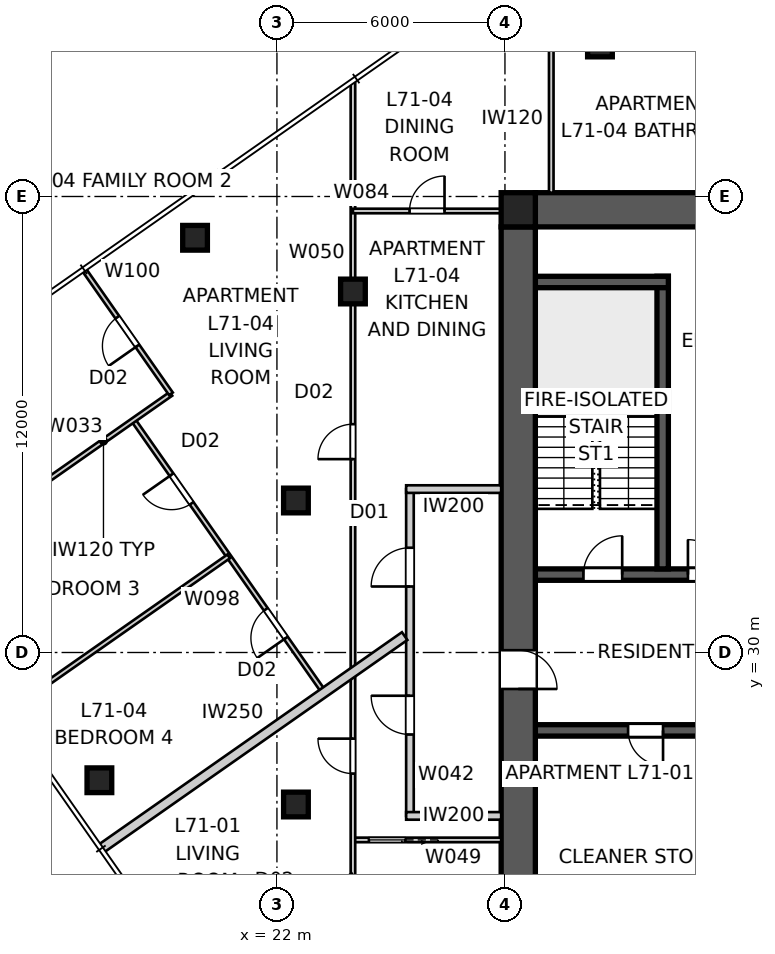
"""IFC4 building model, lengths in metres.
Left out: names, types, materials, properties, quantities, classifications, styles, units other than length and angle.
Written with IfcOpenShell. Run it as: python <this file> out.ifc"""

import sys

from ifc_helpers import new_model, si_unit, direction, frame, frame_2d, origin, origin_2d, place, context, subcontext, project, spatial, polyline, rectangle, outline, extrude, element, fill, save


model = new_model("IFC4")
c1 = context("Model", 3, precision=1e-05, world=origin(), true_north=direction((0.0, 1.0)))
c2 = subcontext(c1, "Body", "Model", "MODEL_VIEW")
j1 = project(units=[si_unit("LENGTHUNIT", "METRE"), si_unit("PLANEANGLEUNIT", "RADIAN")], contexts=[c1])
p1 = place(None, origin())
s1 = spatial("IfcSite", under=j1, at=p1, CompositionType="ELEMENT")
p2 = place(p1, origin())
s2 = spatial("IfcBuilding", under=s1, at=p2, CompositionType="ELEMENT")
p3 = place(p2, frame((0.0, 0.0, 257.4)))
s3 = spatial("IfcBuildingStorey", under=s2, at=p3, CompositionType="ELEMENT", Elevation=257.4)
p4 = place(p3, frame((28.8, 41.65, 0.0), z_axis=(0.0, 0.0, 1.0), x_axis=(1.0, 0.0, 0.0)))
e1 = element("IfcWall", 1, at=p4, inside=s3, PredefinedType="SHEAR", context=c2, shape_type="SweptSolid", body=[
    extrude(outline(polyline([(0.0, -0.45), (22.4, -0.45), (22.4, -0.025), (22.85, -0.025), (22.85, 0.025), (22.4, 0.025), (22.4, 0.45), (0.0, 0.45), (0.0, 0.025), (-0.45, 0.025), (-0.45, -0.025), (0.0, -0.025), (0.0, -0.45)])), origin(), (0.0, 0.0, 1.0), 3.4),
])
p5 = place(p3, frame((28.35, 41.2, 0.0), z_axis=(0.0, 0.0, 1.0), x_axis=(0.0, -1.0, 0.0)))
e2 = element("IfcWall", 2, at=p5, inside=s3, PredefinedType="SHEAR", context=c2, shape_type="SweptSolid", body=[
    extrude(outline(polyline([(0.0, -0.45), (22.4, -0.45), (22.4, -0.025), (22.85, -0.025), (22.85, 0.025), (22.4, 0.025), (22.4, 0.45), (0.0, 0.45), (0.0, 0.025), (-0.45, 0.025), (-0.45, -0.025), (0.0, -0.025), (0.0, -0.45)])), origin(), (0.0, 0.0, 1.0), 3.4),
])
p6 = place(p5, frame((11.14, 0.0, 0.0)))
e3 = element("IfcOpeningElement", 3, at=p6, cuts=e2, PredefinedType="OPENING", context=c2, shape_type="SweptSolid", body=[
    extrude(rectangle(XDim=1.02, YDim=2.4, at=frame_2d((0.51, 1.2))), frame((0.0, 0.46, 0.0), z_axis=(0.0, -1.0, 0.0), x_axis=(1.0, 0.0, 0.0)), (0.0, 0.0, 1.0), 0.92),
])
p7 = place(p3, frame((28.8, 32.05, 0.0), z_axis=(0.0, 0.0, 1.0), x_axis=(1.0, 0.0, 0.0)))
e4 = element("IfcWall", 4, at=p7, inside=s3, PredefinedType="SHEAR", context=c2, shape_type="SweptSolid", body=[
    extrude(rectangle(XDim=22.4, YDim=0.3, at=frame_2d((11.2, 0.0))), origin(), (0.0, 0.0, 1.0), 3.4),
])
p8 = place(p7, frame((19.04, 0.0, 0.0)))
e5 = element("IfcOpeningElement", 5, at=p8, cuts=e4, PredefinedType="OPENING", context=c2, shape_type="SweptSolid", body=[
    extrude(rectangle(XDim=0.92, YDim=2.1, at=frame_2d((0.46, 1.05))), frame((0.0, 0.16, 0.0), z_axis=(0.0, -1.0, 0.0), x_axis=(1.0, 0.0, 0.0)), (0.0, 0.0, 1.0), 0.32),
])
p9 = place(p7, frame((1.265, 0.0, 0.0)))
e6 = element("IfcOpeningElement", 6, at=p9, cuts=e4, PredefinedType="OPENING", context=c2, shape_type="SweptSolid", body=[
    extrude(rectangle(XDim=1.02, YDim=2.1, at=frame_2d((0.51, 1.05))), frame((0.0, 0.16, 0.0), z_axis=(0.0, -1.0, 0.0), x_axis=(1.0, 0.0, 0.0)), (0.0, 0.0, 1.0), 0.32),
])
p10 = place(p7, frame((4.015, 0.0, 0.0)))
e7 = element("IfcOpeningElement", 7, at=p10, cuts=e4, PredefinedType="OPENING", context=c2, shape_type="SweptSolid", body=[
    extrude(rectangle(XDim=0.92, YDim=2.1, at=frame_2d((0.46, 1.05))), frame((0.0, 0.16, 0.0), z_axis=(0.0, -1.0, 0.0), x_axis=(1.0, 0.0, 0.0)), (0.0, 0.0, 1.0), 0.32),
])
p11 = place(p7, frame((7.015, 0.0, 0.0)))
e8 = element("IfcOpeningElement", 8, at=p11, cuts=e4, PredefinedType="OPENING", context=c2, shape_type="SweptSolid", body=[
    extrude(rectangle(XDim=0.92, YDim=2.1, at=frame_2d((0.46, 1.05))), frame((0.0, 0.16, 0.0), z_axis=(0.0, -1.0, 0.0), x_axis=(1.0, 0.0, 0.0)), (0.0, 0.0, 1.0), 0.32),
])
p12 = place(p7, frame((9.34, 0.0, 0.0)))
e9 = element("IfcOpeningElement", 9, at=p12, cuts=e4, PredefinedType="OPENING", context=c2, shape_type="SweptSolid", body=[
    extrude(rectangle(XDim=0.92, YDim=2.1, at=frame_2d((0.46, 1.05))), frame((0.0, 0.16, 0.0), z_axis=(0.0, -1.0, 0.0), x_axis=(1.0, 0.0, 0.0)), (0.0, 0.0, 1.0), 0.32),
])
p13 = place(p7, frame((12.05, 0.0, 0.0)))
e10 = element("IfcOpeningElement", 10, at=p13, cuts=e4, PredefinedType="OPENING", context=c2, shape_type="SweptSolid", body=[
    extrude(rectangle(XDim=1.1, YDim=2.1, at=frame_2d((0.55, 1.05))), frame((0.0, 0.16, 0.0), z_axis=(0.0, -1.0, 0.0), x_axis=(1.0, 0.0, 0.0)), (0.0, 0.0, 1.0), 0.32),
])
p14 = place(p7, frame((14.85, 0.0, 0.0)))
e11 = element("IfcOpeningElement", 11, at=p14, cuts=e4, PredefinedType="OPENING", context=c2, shape_type="SweptSolid", body=[
    extrude(rectangle(XDim=1.1, YDim=2.1, at=frame_2d((0.55, 1.05))), frame((0.0, 0.16, 0.0), z_axis=(0.0, -1.0, 0.0), x_axis=(1.0, 0.0, 0.0)), (0.0, 0.0, 1.0), 0.32),
])
p15 = place(p3, frame((51.2, 27.95, 0.0), z_axis=(0.0, 0.0, 1.0), x_axis=(-1.0, 0.0, 0.0)))
e12 = element("IfcWall", 12, at=p15, inside=s3, PredefinedType="SHEAR", context=c2, shape_type="SweptSolid", body=[
    extrude(rectangle(XDim=22.4, YDim=0.3, at=frame_2d((11.2, 0.0))), origin(), (0.0, 0.0, 1.0), 3.4),
])
p16 = place(p15, frame((19.04, 0.0, 0.0)))
e13 = element("IfcOpeningElement", 13, at=p16, cuts=e12, PredefinedType="OPENING", context=c2, shape_type="SweptSolid", body=[
    extrude(rectangle(XDim=0.92, YDim=2.1, at=frame_2d((0.46, 1.05))), frame((0.0, 0.16, 0.0), z_axis=(0.0, -1.0, 0.0), x_axis=(1.0, 0.0, 0.0)), (0.0, 0.0, 1.0), 0.32),
])
p17 = place(p15, frame((1.265, 0.0, 0.0)))
e14 = element("IfcOpeningElement", 14, at=p17, cuts=e12, PredefinedType="OPENING", context=c2, shape_type="SweptSolid", body=[
    extrude(rectangle(XDim=1.02, YDim=2.1, at=frame_2d((0.51, 1.05))), frame((0.0, 0.16, 0.0), z_axis=(0.0, -1.0, 0.0), x_axis=(1.0, 0.0, 0.0)), (0.0, 0.0, 1.0), 0.32),
])
p18 = place(p15, frame((4.015, 0.0, 0.0)))
e15 = element("IfcOpeningElement", 15, at=p18, cuts=e12, PredefinedType="OPENING", context=c2, shape_type="SweptSolid", body=[
    extrude(rectangle(XDim=0.92, YDim=2.1, at=frame_2d((0.46, 1.05))), frame((0.0, 0.16, 0.0), z_axis=(0.0, -1.0, 0.0), x_axis=(1.0, 0.0, 0.0)), (0.0, 0.0, 1.0), 0.32),
])
p19 = place(p15, frame((9.79, 0.0, 0.0)))
e16 = element("IfcOpeningElement", 16, at=p19, cuts=e12, PredefinedType="OPENING", context=c2, shape_type="SweptSolid", body=[
    extrude(rectangle(XDim=0.92, YDim=2.1, at=frame_2d((0.46, 1.05))), frame((0.0, 0.16, 0.0), z_axis=(0.0, -1.0, 0.0), x_axis=(1.0, 0.0, 0.0)), (0.0, 0.0, 1.0), 0.32),
])
p20 = place(p15, frame((6.115, 0.0, 0.0)))
e17 = element("IfcOpeningElement", 17, at=p20, cuts=e12, PredefinedType="OPENING", context=c2, shape_type="SweptSolid", body=[
    extrude(rectangle(XDim=0.92, YDim=2.1, at=frame_2d((0.46, 1.05))), frame((0.0, 0.16, 0.0), z_axis=(0.0, -1.0, 0.0), x_axis=(1.0, 0.0, 0.0)), (0.0, 0.0, 1.0), 0.32),
])
p21 = place(p15, frame((12.05, 0.0, 0.0)))
e18 = element("IfcOpeningElement", 18, at=p21, cuts=e12, PredefinedType="OPENING", context=c2, shape_type="SweptSolid", body=[
    extrude(rectangle(XDim=1.1, YDim=2.1, at=frame_2d((0.55, 1.05))), frame((0.0, 0.16, 0.0), z_axis=(0.0, -1.0, 0.0), x_axis=(1.0, 0.0, 0.0)), (0.0, 0.0, 1.0), 0.32),
])
p22 = place(p15, frame((14.85, 0.0, 0.0)))
e19 = element("IfcOpeningElement", 19, at=p22, cuts=e12, PredefinedType="OPENING", context=c2, shape_type="SweptSolid", body=[
    extrude(rectangle(XDim=1.1, YDim=2.1, at=frame_2d((0.55, 1.05))), frame((0.0, 0.16, 0.0), z_axis=(0.0, -1.0, 0.0), x_axis=(1.0, 0.0, 0.0)), (0.0, 0.0, 1.0), 0.32),
])
p23 = place(p3, frame((32.15, 32.2, 0.0), z_axis=(0.0, 0.0, 1.0), x_axis=(0.0, 1.0, 0.0)))
e20 = element("IfcWall", 20, at=p23, inside=s3, PredefinedType="SHEAR", context=c2, shape_type="SweptSolid", body=[
    extrude(rectangle(XDim=7.7, YDim=0.3, at=frame_2d((3.85, 0.0))), origin(), (0.0, 0.0, 1.0), 3.4),
])
p24 = place(p3, frame((28.8, 39.75, 0.0), z_axis=(0.0, 0.0, 1.0), x_axis=(1.0, 0.0, 0.0)))
e21 = element("IfcWall", 21, at=p24, inside=s3, PredefinedType="SHEAR", context=c2, shape_type="SweptSolid", body=[
    extrude(rectangle(XDim=3.5, YDim=0.3, at=frame_2d((1.75, 0.0))), origin(), (0.0, 0.0, 1.0), 3.4),
])
p25 = place(p3, frame((28.35, 41.65, 0.0), z_axis=(0.0, 0.0, 1.0), x_axis=(1.0, 0.0, 0.0)))
e22 = element("IfcColumn", 22, at=p25, inside=s3, PredefinedType="COLUMN", context=c2, shape_type="SweptSolid", body=[
    extrude(rectangle(XDim=0.9, YDim=0.9, at=origin_2d()), origin(), (0.0, 0.0, 1.0), 3.4),
])
for number, where, z_axis, x_axis in (
    (23, (19.845, 40.914, 0.0), (0.0, 0.0, 1.0), (1.0, 0.0, 0.0)),
    (24, (17.328, 26.638, 0.0), (0.0, 0.0, 1.0), (1.0, 0.0, 0.0)),
    (25, (30.5, 46.0, 0.0), (0.0, 0.0, 1.0), (1.0, 0.0, 0.0)),
    (26, (24.0, 39.5, 0.0), (0.0, 0.0, 1.0), (1.0, 0.0, 0.0)),
    (27, (22.5, 34.0, 0.0), (0.0, 0.0, 1.0), (1.0, 0.0, 0.0)),
    (28, (22.5, 26.0, 0.0), (0.0, 0.0, 1.0), (1.0, 0.0, 0.0)),
):
    element("IfcColumn", number, at=place(p3, frame(where, z_axis=z_axis, x_axis=x_axis)), inside=s3, PredefinedType="COLUMN", context=c2, shape_type="SweptSolid", body=[
        extrude(rectangle(XDim=0.65, YDim=0.65, at=origin_2d()), origin(), (0.0, 0.0, 1.0), 3.4),
    ])
p26 = place(p3, frame((25.5, 25.7, 0.0), z_axis=(0.0, 0.0, 1.0), x_axis=(0.0, 1.0, 0.0)))
e29 = element("IfcWall", 29, at=p26, inside=s3, PredefinedType="PARTITIONING", context=c2, shape_type="SweptSolid", body=[
    extrude(rectangle(XDim=8.6, YDim=0.2, at=frame_2d((4.3, 0.0))), origin(), (0.0, 0.0, 1.0), 3.25),
])
p27 = place(p26, frame((2.142, 0.0, 0.0)))
e30 = element("IfcOpeningElement", 30, at=p27, cuts=e29, PredefinedType="OPENING", context=c2, shape_type="SweptSolid", body=[
    extrude(rectangle(XDim=1.02, YDim=2.34, at=frame_2d((0.51, 1.17))), frame((0.0, 0.11, 0.0), z_axis=(0.0, -1.0, 0.0), x_axis=(1.0, 0.0, 0.0)), (0.0, 0.0, 1.0), 0.22),
])
p28 = place(p26, frame((6.037, 0.0, 0.0)))
e31 = element("IfcOpeningElement", 31, at=p28, cuts=e29, PredefinedType="OPENING", context=c2, shape_type="SweptSolid", body=[
    extrude(rectangle(XDim=1.02, YDim=2.34, at=frame_2d((0.51, 1.17))), frame((0.0, 0.11, 0.0), z_axis=(0.0, -1.0, 0.0), x_axis=(1.0, 0.0, 0.0)), (0.0, 0.0, 1.0), 0.22),
])
for number, where, z_axis, x_axis in (
    (32, (27.9, 34.3, 0.0), (0.0, 0.0, 1.0), (-1.0, 0.0, 0.0)),
    (33, (27.9, 25.7, 0.0), (0.0, 0.0, 1.0), (-1.0, 0.0, 0.0)),
):
    element("IfcWall", number, at=place(p3, frame(where, z_axis=z_axis, x_axis=x_axis)), inside=s3, PredefinedType="PARTITIONING", context=c2, shape_type="SweptSolid", body=[
        extrude(rectangle(XDim=2.5, YDim=0.2, at=frame_2d((1.25, 0.0))), origin(), (0.0, 0.0, 1.0), 3.25),
    ])
p29 = place(p3, frame((17.369, 24.836, 0.0), z_axis=(0.0, 0.0, 1.0), x_axis=(0.81915902312, 0.573566469418, 0.0)))
e34 = element("IfcWall", 34, at=p29, inside=s3, PredefinedType="PARTITIONING", context=c2, shape_type="SweptSolid", body=[
    extrude(rectangle(XDim=9.756, YDim=0.25, at=frame_2d((4.878, 0.0))), origin(), (0.0, 0.0, 1.0), 3.25),
])
p30 = place(p3, frame((27.9, 25.068, 0.0), z_axis=(0.0, 0.0, 1.0), x_axis=(-1.0, 0.0, 0.0)))
e35 = element("IfcWall", 35, at=p30, inside=s3, PredefinedType="PARTITIONING", context=c2, shape_type="SweptSolid", body=[
    extrude(rectangle(XDim=3.9, YDim=0.12, at=frame_2d((1.95, 0.0))), origin(), (0.0, 0.0, 1.0), 3.25),
])
p31 = place(p30, frame((2.52, 0.0, 0.0)))
e36 = element("IfcOpeningElement", 36, at=p31, cuts=e35, PredefinedType="OPENING", context=c2, shape_type="SweptSolid", body=[
    extrude(rectangle(XDim=0.96, YDim=2.1, at=frame_2d((0.48, 1.05))), frame((0.0, 0.07, 0.0), z_axis=(0.0, -1.0, 0.0), x_axis=(1.0, 0.0, 0.0)), (0.0, 0.0, 1.0), 0.14),
])
p32 = place(p3, frame((24.0, 18.797, 0.0), z_axis=(0.0, 0.0, 1.0), x_axis=(0.0, 1.0, 0.0)))
e37 = element("IfcWall", 37, at=p32, inside=s3, PredefinedType="PARTITIONING", context=c2, shape_type="SweptSolid", body=[
    extrude(rectangle(XDim=26.198, YDim=0.12, at=frame_2d((13.099, 0.0))), origin(), (0.0, 0.0, 1.0), 2.55),
])
p33 = place(p32, frame((8.016, 0.0, 0.0)))
e38 = element("IfcOpeningElement", 38, at=p33, cuts=e37, PredefinedType="OPENING", context=c2, shape_type="SweptSolid", body=[
    extrude(rectangle(XDim=0.92, YDim=2.34, at=frame_2d((0.46, 1.17))), frame((0.0, 0.07, 0.0), z_axis=(0.0, -1.0, 0.0), x_axis=(1.0, 0.0, 0.0)), (0.0, 0.0, 1.0), 0.14),
])
p34 = place(p32, frame((16.292, 0.0, 0.0)))
e39 = element("IfcOpeningElement", 39, at=p34, cuts=e37, PredefinedType="OPENING", context=c2, shape_type="SweptSolid", body=[
    extrude(rectangle(XDim=0.92, YDim=2.34, at=frame_2d((0.46, 1.17))), frame((0.0, 0.07, 0.0), z_axis=(0.0, -1.0, 0.0), x_axis=(1.0, 0.0, 0.0)), (0.0, 0.0, 1.0), 0.14),
])
p35 = place(p3, frame((24.0, 41.619, 0.0), z_axis=(0.0, 0.0, 1.0), x_axis=(1.0, 0.0, 0.0)))
e40 = element("IfcWall", 40, at=p35, inside=s3, PredefinedType="PARTITIONING", context=c2, shape_type="SweptSolid", body=[
    extrude(rectangle(XDim=3.9, YDim=0.12, at=frame_2d((1.95, 0.0))), origin(), (0.0, 0.0, 1.0), 3.25),
])
p36 = place(p35, frame((1.49, 0.0, 0.0)))
e41 = element("IfcOpeningElement", 41, at=p36, cuts=e40, PredefinedType="OPENING", context=c2, shape_type="SweptSolid", body=[
    extrude(rectangle(XDim=0.92, YDim=2.1, at=frame_2d((0.46, 1.05))), frame((0.0, 0.07, 0.0), z_axis=(0.0, -1.0, 0.0), x_axis=(1.0, 0.0, 0.0)), (0.0, 0.0, 1.0), 0.14),
])
p37 = place(p3, frame((29.219, 42.1, 0.0), z_axis=(0.0, 0.0, 1.0), x_axis=(0.0, 1.0, 0.0)))
e42 = element("IfcWall", 42, at=p37, inside=s3, PredefinedType="PARTITIONING", context=c2, shape_type="SweptSolid", body=[
    extrude(rectangle(XDim=3.9, YDim=0.12, at=frame_2d((1.95, 0.0))), origin(), (0.0, 0.0, 1.0), 3.25),
])
p38 = place(p3, frame((23.24, 28.947, 0.0), z_axis=(0.0, 0.0, 1.0), x_axis=(-0.573582185905, 0.819148018378, 0.0)))
e43 = element("IfcWall", 43, at=p38, inside=s3, PredefinedType="PARTITIONING", context=c2, shape_type="SweptSolid", body=[
    extrude(rectangle(XDim=8.75, YDim=0.12, at=frame_2d((4.375, 0.0))), origin(), (0.0, 0.0, 1.0), 3.25),
])
p39 = place(p38, frame((6.078, 0.0, 0.0)))
e44 = element("IfcOpeningElement", 44, at=p39, cuts=e43, PredefinedType="OPENING", context=c2, shape_type="SweptSolid", body=[
    extrude(rectangle(XDim=0.92, YDim=2.34, at=frame_2d((0.46, 1.17))), frame((0.0, 0.07, 0.0), z_axis=(0.0, -1.0, 0.0), x_axis=(1.0, 0.0, 0.0)), (0.0, 0.0, 1.0), 0.14),
])
p40 = place(p38, frame((1.752, 0.0, 0.0)))
e45 = element("IfcOpeningElement", 45, at=p40, cuts=e43, PredefinedType="OPENING", context=c2, shape_type="SweptSolid", body=[
    extrude(rectangle(XDim=0.92, YDim=2.34, at=frame_2d((0.46, 1.17))), frame((0.0, 0.07, 0.0), z_axis=(0.0, -1.0, 0.0), x_axis=(1.0, 0.0, 0.0)), (0.0, 0.0, 1.0), 0.14),
])
p41 = place(p3, frame((15.66, 34.321, 0.0), z_axis=(0.0, 0.0, 1.0), x_axis=(0.819139307094, 0.573594626521, 0.0)))
e46 = element("IfcWall", 46, at=p41, inside=s3, PredefinedType="PARTITIONING", context=c2, shape_type="SweptSolid", body=[
    extrude(rectangle(XDim=4.335, YDim=0.12, at=frame_2d((2.167, 0.0))), origin(), (0.0, 0.0, 1.0), 3.25),
])
p42 = place(p3, frame((19.211, 36.807, 0.0), z_axis=(0.0, 0.0, 1.0), x_axis=(-0.573578200724, 0.819150808859, 0.0)))
e47 = element("IfcWall", 47, at=p42, inside=s3, PredefinedType="PARTITIONING", context=c2, shape_type="SweptSolid", body=[
    extrude(rectangle(XDim=3.96, YDim=0.12, at=frame_2d((1.98, 0.0))), origin(), (0.0, 0.0, 1.0), 3.25),
])
p43 = place(p42, frame((1.54, 0.0, 0.0)))
e48 = element("IfcOpeningElement", 48, at=p43, cuts=e47, PredefinedType="OPENING", context=c2, shape_type="SweptSolid", body=[
    extrude(rectangle(XDim=0.92, YDim=2.34, at=frame_2d((0.46, 1.17))), frame((0.0, 0.07, 0.0), z_axis=(0.0, -1.0, 0.0), x_axis=(1.0, 0.0, 0.0)), (0.0, 0.0, 1.0), 0.14),
])
p44 = place(p3, frame((20.731, 32.53, 0.0), z_axis=(0.0, 0.0, 1.0), x_axis=(-0.819153056029, -0.573574991434, 0.0)))
e49 = element("IfcWall", 49, at=p44, inside=s3, PredefinedType="PARTITIONING", context=c2, shape_type="SweptSolid", body=[
    extrude(rectangle(XDim=7.127, YDim=0.12, at=frame_2d((3.563, 0.0))), origin(), (0.0, 0.0, 1.0), 3.25),
])
p45 = place(p3, frame((27.9, 41.619, 0.0), z_axis=(0.0, 0.0, 1.0), x_axis=(0.999397924003, 0.034695669724, 0.0)))
e50 = element("IfcWall", 50, at=p45, inside=s3, PredefinedType="PARTITIONING", context=c2, shape_type="SweptSolid", body=[
    extrude(rectangle(XDim=0.901, YDim=0.12, at=frame_2d((0.45, 0.0))), origin(), (0.0, 0.0, 1.0), 3.25),
])
p46 = place(p16, origin())
e51 = element("IfcDoor", 51, at=p46, inside=s3, OperationType="SINGLE_SWING_LEFT", PredefinedType="DOOR", context=c2, shape_type="SweptSolid", body=[
    extrude(rectangle(XDim=0.92, YDim=2.1, at=frame_2d((0.46, 1.05))), frame((0.0, 0.025, 0.0), z_axis=(0.0, -1.0, 0.0), x_axis=(1.0, 0.0, 0.0)), (0.0, 0.0, 1.0), 0.05),
])
fill(e13, e51)
p47 = place(p9, origin())
e52 = element("IfcDoor", 52, at=p47, inside=s3, OperationType="SINGLE_SWING_RIGHT", PredefinedType="DOOR", context=c2, shape_type="SweptSolid", body=[
    extrude(rectangle(XDim=1.02, YDim=2.1, at=frame_2d((0.51, 1.05))), frame((0.0, 0.025, 0.0), z_axis=(0.0, -1.0, 0.0), x_axis=(1.0, 0.0, 0.0)), (0.0, 0.0, 1.0), 0.05),
])
fill(e6, e52)
p48 = place(p10, origin())
e53 = element("IfcDoor", 53, at=p48, inside=s3, OperationType="SINGLE_SWING_LEFT", PredefinedType="DOOR", context=c2, shape_type="SweptSolid", body=[
    extrude(rectangle(XDim=0.92, YDim=2.1, at=frame_2d((0.46, 1.05))), frame((0.0, 0.025, 0.0), z_axis=(0.0, -1.0, 0.0), x_axis=(1.0, 0.0, 0.0)), (0.0, 0.0, 1.0), 0.05),
])
fill(e7, e53)
p49 = place(p27, origin())
e54 = element("IfcDoor", 54, at=p49, inside=s3, OperationType="SINGLE_SWING_RIGHT", PredefinedType="DOOR", context=c2, shape_type="SweptSolid", body=[
    extrude(rectangle(XDim=1.02, YDim=2.34, at=frame_2d((0.51, 1.17))), frame((0.0, 0.025, 0.0), z_axis=(0.0, -1.0, 0.0), x_axis=(1.0, 0.0, 0.0)), (0.0, 0.0, 1.0), 0.05),
])
fill(e30, e54)
p50 = place(p28, origin())
e55 = element("IfcDoor", 55, at=p50, inside=s3, OperationType="SINGLE_SWING_LEFT", PredefinedType="DOOR", context=c2, shape_type="SweptSolid", body=[
    extrude(rectangle(XDim=1.02, YDim=2.34, at=frame_2d((0.51, 1.17))), frame((0.0, 0.025, 0.0), z_axis=(0.0, -1.0, 0.0), x_axis=(1.0, 0.0, 0.0)), (0.0, 0.0, 1.0), 0.05),
])
fill(e31, e55)
p51 = place(p33, origin())
e56 = element("IfcDoor", 56, at=p51, inside=s3, OperationType="SINGLE_SWING_RIGHT", PredefinedType="DOOR", context=c2, shape_type="SweptSolid", body=[
    extrude(rectangle(XDim=0.92, YDim=2.34, at=frame_2d((0.46, 1.17))), frame((0.0, 0.025, 0.0), z_axis=(0.0, -1.0, 0.0), x_axis=(1.0, 0.0, 0.0)), (0.0, 0.0, 1.0), 0.05),
])
fill(e38, e56)
p52 = place(p31, origin())
e57 = element("IfcDoor", 57, at=p52, inside=s3, OperationType="SLIDING_TO_LEFT", PredefinedType="DOOR", context=c2, shape_type="SweptSolid", body=[
    extrude(rectangle(XDim=0.96, YDim=2.1, at=frame_2d((0.48, 1.05))), frame((0.0, 0.025, 0.0), z_axis=(0.0, -1.0, 0.0), x_axis=(1.0, 0.0, 0.0)), (0.0, 0.0, 1.0), 0.05),
])
fill(e36, e57)
p53 = place(p34, origin())
e58 = element("IfcDoor", 58, at=p53, inside=s3, OperationType="SINGLE_SWING_LEFT", PredefinedType="DOOR", context=c2, shape_type="SweptSolid", body=[
    extrude(rectangle(XDim=0.92, YDim=2.34, at=frame_2d((0.46, 1.17))), frame((0.0, 0.025, 0.0), z_axis=(0.0, -1.0, 0.0), x_axis=(1.0, 0.0, 0.0)), (0.0, 0.0, 1.0), 0.05),
])
fill(e39, e58)
p54 = place(p36, origin())
e59 = element("IfcDoor", 59, at=p54, inside=s3, OperationType="SINGLE_SWING_RIGHT", PredefinedType="DOOR", context=c2, shape_type="SweptSolid", body=[
    extrude(rectangle(XDim=0.92, YDim=2.1, at=frame_2d((0.46, 1.05))), frame((0.0, 0.025, 0.0), z_axis=(0.0, -1.0, 0.0), x_axis=(1.0, 0.0, 0.0)), (0.0, 0.0, 1.0), 0.05),
])
fill(e41, e59)
p55 = place(p39, origin())
e60 = element("IfcDoor", 60, at=p55, inside=s3, OperationType="SINGLE_SWING_RIGHT", PredefinedType="DOOR", context=c2, shape_type="SweptSolid", body=[
    extrude(rectangle(XDim=0.92, YDim=2.34, at=frame_2d((0.46, 1.17))), frame((0.0, 0.025, 0.0), z_axis=(0.0, -1.0, 0.0), x_axis=(1.0, 0.0, 0.0)), (0.0, 0.0, 1.0), 0.05),
])
fill(e44, e60)
p56 = place(p40, origin())
e61 = element("IfcDoor", 61, at=p56, inside=s3, OperationType="SINGLE_SWING_LEFT", PredefinedType="DOOR", context=c2, shape_type="SweptSolid", body=[
    extrude(rectangle(XDim=0.92, YDim=2.34, at=frame_2d((0.46, 1.17))), frame((0.0, 0.025, 0.0), z_axis=(0.0, -1.0, 0.0), x_axis=(1.0, 0.0, 0.0)), (0.0, 0.0, 1.0), 0.05),
])
fill(e45, e61)
p57 = place(p43, origin())
e62 = element("IfcDoor", 62, at=p57, inside=s3, OperationType="SINGLE_SWING_LEFT", PredefinedType="DOOR", context=c2, shape_type="SweptSolid", body=[
    extrude(rectangle(XDim=0.92, YDim=2.34, at=frame_2d((0.46, 1.17))), frame((0.0, 0.025, 0.0), z_axis=(0.0, -1.0, 0.0), x_axis=(1.0, 0.0, 0.0)), (0.0, 0.0, 1.0), 0.05),
])
fill(e48, e62)
p58 = place(p6, origin())
e63 = element("IfcDoor", 63, at=p58, inside=s3, OperationType="SINGLE_SWING_RIGHT", PredefinedType="DOOR", context=c2, shape_type="SweptSolid", body=[
    extrude(rectangle(XDim=1.02, YDim=2.4, at=frame_2d((0.51, 1.2))), frame((0.0, 0.025, 0.0), z_axis=(0.0, -1.0, 0.0), x_axis=(1.0, 0.0, 0.0)), (0.0, 0.0, 1.0), 0.05),
])
fill(e3, e63)
save(model, sys.argv[1])
